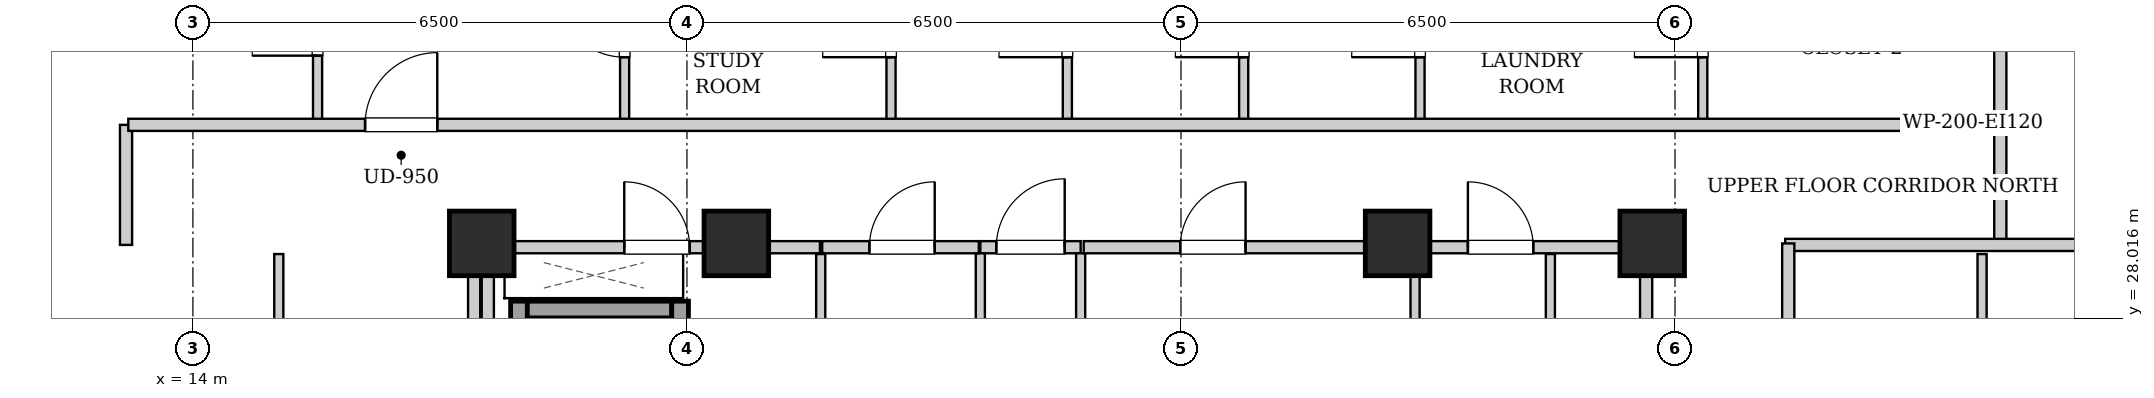
"""IFC4 building model, lengths in metres.
Left out: names, types, materials, properties, quantities, classifications, styles, units other than length and angle.
Written with IfcOpenShell. Run it as: python <this file> out.ifc"""

import sys

from ifc_helpers import new_model, si_unit, direction, frame, frame_2d, origin, origin_2d, place, context, subcontext, project, spatial, rectangle, extrude, element, fill, save


model = new_model("IFC4")
c1 = context("Model", 3, precision=1e-05, world=origin(), true_north=direction((0.0, 1.0)))
c2 = subcontext(c1, "Body", "Model", "MODEL_VIEW")
j1 = project(units=[si_unit("LENGTHUNIT", "METRE"), si_unit("PLANEANGLEUNIT", "RADIAN")], contexts=[c1])
p1 = place(None, origin())
s1 = spatial("IfcSite", under=j1, at=p1, CompositionType="ELEMENT")
p2 = place(p1, origin())
s2 = spatial("IfcBuilding", under=s1, at=p2, CompositionType="ELEMENT")
p3 = place(p2, frame((0.0, 0.0, 194.2)))
s3 = spatial("IfcBuildingStorey", under=s2, at=p3, CompositionType="ELEMENT", Elevation=194.2)
for number, where, z_axis, x_axis in (
    (1, (17.8, 29.0, 0.0), (0.0, 0.0, 1.0), (1.0, 0.0, 0.0)),
    (2, (21.15, 29.0, 0.0), (0.0, 0.0, 1.0), (1.0, 0.0, 0.0)),
    (3, (29.85, 29.0, 0.0), (0.0, 0.0, 1.0), (1.0, 0.0, 0.0)),
    (4, (33.2, 29.0, 0.0), (0.0, 0.0, 1.0), (1.0, 0.0, 0.0)),
):
    element("IfcColumn", number, at=place(p3, frame(where, z_axis=z_axis, x_axis=x_axis)), inside=s3, PredefinedType="COLUMN", context=c2, shape_type="SweptSolid", body=[
        extrude(rectangle(XDim=0.85, YDim=0.85, at=origin_2d()), origin(), (0.0, 0.0, 1.0), 3.3),
    ])
p4 = place(p3, frame((18.29, 24.1, 0.0), z_axis=(0.0, 0.0, 1.0), x_axis=(0.0, 1.0, 0.0)))
e5 = element("IfcWall", 5, at=p4, inside=s3, PredefinedType="SHEAR", context=c2, shape_type="SweptSolid", body=[
    extrude(rectangle(XDim=4.14, YDim=0.22, at=frame_2d((2.07, 0.0))), origin(), (0.0, 0.0, 1.0), 3.04),
])
p5 = place(p3, frame((18.4, 28.13, 0.0), z_axis=(0.0, 0.0, 1.0), x_axis=(1.0, 0.0, 0.0)))
e6 = element("IfcWall", 6, at=p5, inside=s3, PredefinedType="SHEAR", context=c2, shape_type="SweptSolid", body=[
    extrude(rectangle(XDim=1.9, YDim=0.22, at=frame_2d((0.95, 0.0))), origin(), (0.0, 0.0, 1.0), 3.04),
])
p6 = place(p3, frame((20.41, 26.06, 0.0), z_axis=(0.0, 0.0, 1.0), x_axis=(0.0, 1.0, 0.0)))
e7 = element("IfcWall", 7, at=p6, inside=s3, PredefinedType="SHEAR", context=c2, shape_type="SweptSolid", body=[
    extrude(rectangle(XDim=2.18, YDim=0.22, at=frame_2d((1.09, 0.0))), origin(), (0.0, 0.0, 1.0), 3.04),
])
p7 = place(p6, frame((0.54, 0.0, 0.0)))
e8 = element("IfcOpeningElement", 8, at=p7, cuts=e7, PredefinedType="OPENING", context=c2, shape_type="SweptSolid", body=[
    extrude(rectangle(XDim=1.1, YDim=2.15, at=frame_2d((0.55, 1.075))), frame((0.0, 0.12, 0.0), z_axis=(0.0, -1.0, 0.0), x_axis=(1.0, 0.0, 0.0)), (0.0, 0.0, 1.0), 0.24),
])
for number, where, z_axis, x_axis in (
    (9, (17.88, 24.12, 0.0), (0.0, 0.0, 1.0), (0.0, 1.0, 0.0)),
    (10, (33.12, 24.12, 0.0), (0.0, 0.0, 1.0), (0.0, 1.0, 0.0)),
):
    element("IfcWall", number, at=place(p3, frame(where, z_axis=z_axis, x_axis=x_axis)), inside=s3, PredefinedType="PARTITIONING", context=c2, shape_type="SweptSolid", body=[
        extrude(rectangle(XDim=4.76, YDim=0.16, at=frame_2d((2.38, 0.0))), origin(), (0.0, 0.0, 1.0), 3.04),
    ])
p8 = place(p3, frame((24.36, 28.95, 0.0), z_axis=(0.0, 0.0, 1.0), x_axis=(1.0, 0.0, 0.0)))
e11 = element("IfcWall", 11, at=p8, inside=s3, PredefinedType="PARTITIONING", context=c2, shape_type="SweptSolid", body=[
    extrude(rectangle(XDim=1.32, YDim=0.16, at=frame_2d((0.66, 0.0))), origin(), (0.0, 0.0, 1.0), 2.556),
])
p9 = place(p8, frame((0.21, 0.0, 0.0)))
e12 = element("IfcOpeningElement", 12, at=p9, cuts=e11, PredefinedType="OPENING", context=c2, shape_type="SweptSolid", body=[
    extrude(rectangle(XDim=0.9, YDim=2.05, at=frame_2d((0.45, 1.025))), frame((0.0, 0.09, 0.0), z_axis=(0.0, -1.0, 0.0), x_axis=(1.0, 0.0, 0.0)), (0.0, 0.0, 1.0), 0.18),
])
p10 = place(p3, frame((17.96, 28.95, 0.0), z_axis=(0.0, 0.0, 1.0), x_axis=(1.0, 0.0, 0.0)))
e13 = element("IfcWall", 13, at=p10, inside=s3, PredefinedType="PARTITIONING", context=c2, shape_type="SweptSolid", body=[
    extrude(rectangle(XDim=4.29, YDim=0.16, at=frame_2d((2.145, 0.0))), origin(), (0.0, 0.0, 1.0), 2.556),
])
p11 = place(p10, frame((1.715, 0.0, 0.0)))
e14 = element("IfcOpeningElement", 14, at=p11, cuts=e13, PredefinedType="OPENING", context=c2, shape_type="SweptSolid", body=[
    extrude(rectangle(XDim=0.86, YDim=2.05, at=frame_2d((0.43, 1.025))), frame((0.0, 0.09, 0.0), z_axis=(0.0, -1.0, 0.0), x_axis=(1.0, 0.0, 0.0)), (0.0, 0.0, 1.0), 0.18),
])
for number, where, z_axis, x_axis in (
    (15, (24.36, 25.0, 0.0), (0.0, 0.0, 1.0), (0.0, 1.0, 0.0)),
    (16, (25.68, 25.0, 0.0), (0.0, 0.0, 1.0), (0.0, 1.0, 0.0)),
):
    element("IfcWall", number, at=place(p3, frame(where, z_axis=z_axis, x_axis=x_axis)), inside=s3, PredefinedType="PARTITIONING", context=c2, shape_type="SweptSolid", body=[
        extrude(rectangle(XDim=3.87, YDim=0.12, at=frame_2d((1.935, 0.0))), origin(), (0.0, 0.0, 1.0), 3.04),
    ])
p12 = place(p3, frame((30.08, 26.18, 0.0), z_axis=(0.0, 0.0, 1.0), x_axis=(0.0, 1.0, 0.0)))
e17 = element("IfcWall", 17, at=p12, inside=s3, PredefinedType="PARTITIONING", context=c2, shape_type="SweptSolid", body=[
    extrude(rectangle(XDim=2.68, YDim=0.12, at=frame_2d((1.34, 0.0))), origin(), (0.0, 0.0, 1.0), 3.04),
])
p13 = place(p3, frame((31.86, 26.2, 0.0), z_axis=(0.0, 0.0, 1.0), x_axis=(0.0, 1.0, 0.0)))
e18 = element("IfcWall", 18, at=p13, inside=s3, PredefinedType="PARTITIONING", context=c2, shape_type="SweptSolid", body=[
    extrude(rectangle(XDim=2.66, YDim=0.12, at=frame_2d((1.33, 0.0))), origin(), (0.0, 0.0, 1.0), 3.04),
])
p14 = place(p13, frame((0.92, 0.0, 0.0)))
e19 = element("IfcOpeningElement", 19, at=p14, cuts=e18, PredefinedType="OPENING", context=c2, shape_type="SweptSolid", body=[
    extrude(rectangle(XDim=0.86, YDim=2.05, at=frame_2d((0.43, 1.025))), frame((0.0, 0.07, 0.0), z_axis=(0.0, -1.0, 0.0), x_axis=(1.0, 0.0, 0.0)), (0.0, 0.0, 1.0), 0.14),
])
p15 = place(p3, frame((30.08, 28.95, 0.0), z_axis=(0.0, 0.0, 1.0), x_axis=(1.0, 0.0, 0.0)))
e20 = element("IfcWall", 20, at=p15, inside=s3, PredefinedType="PARTITIONING", context=c2, shape_type="SweptSolid", body=[
    extrude(rectangle(XDim=2.96, YDim=0.16, at=frame_2d((1.48, 0.0))), origin(), (0.0, 0.0, 1.0), 3.04),
])
p16 = place(p15, frame((0.695, 0.0, 0.0)))
e21 = element("IfcOpeningElement", 21, at=p16, cuts=e20, PredefinedType="OPENING", context=c2, shape_type="SweptSolid", body=[
    extrude(rectangle(XDim=0.86, YDim=2.05, at=frame_2d((0.43, 1.025))), frame((0.0, 0.09, 0.0), z_axis=(0.0, -1.0, 0.0), x_axis=(1.0, 0.0, 0.0)), (0.0, 0.0, 1.0), 0.18),
])
p17 = place(p3, frame((22.26, 25.0, 0.0), z_axis=(0.0, 0.0, 1.0), x_axis=(0.0, 1.0, 0.0)))
e22 = element("IfcWall", 22, at=p17, inside=s3, PredefinedType="PARTITIONING", context=c2, shape_type="SweptSolid", body=[
    extrude(rectangle(XDim=3.86, YDim=0.12, at=frame_2d((1.93, 0.0))), origin(), (0.0, 0.0, 1.0), 3.04),
])
p18 = place(p3, frame((22.28, 28.95, 0.0), z_axis=(0.0, 0.0, 1.0), x_axis=(1.0, 0.0, 0.0)))
e23 = element("IfcWall", 23, at=p18, inside=s3, PredefinedType="PARTITIONING", context=c2, shape_type="SweptSolid", body=[
    extrude(rectangle(XDim=2.06, YDim=0.16, at=frame_2d((1.03, 0.0))), origin(), (0.0, 0.0, 1.0), 2.556),
])
p19 = place(p18, frame((0.62, 0.0, 0.0)))
e24 = element("IfcOpeningElement", 24, at=p19, cuts=e23, PredefinedType="OPENING", context=c2, shape_type="SweptSolid", body=[
    extrude(rectangle(XDim=0.86, YDim=2.05, at=frame_2d((0.43, 1.025))), frame((0.0, 0.09, 0.0), z_axis=(0.0, -1.0, 0.0), x_axis=(1.0, 0.0, 0.0)), (0.0, 0.0, 1.0), 0.18),
])
p20 = place(p3, frame((25.72, 28.95, 0.0), z_axis=(0.0, 0.0, 1.0), x_axis=(1.0, 0.0, 0.0)))
e25 = element("IfcWall", 25, at=p20, inside=s3, PredefinedType="PARTITIONING", context=c2, shape_type="SweptSolid", body=[
    extrude(rectangle(XDim=4.32, YDim=0.16, at=frame_2d((2.16, 0.0))), origin(), (0.0, 0.0, 1.0), 2.556),
])
p21 = place(p20, frame((1.27, 0.0, 0.0)))
e26 = element("IfcOpeningElement", 26, at=p21, cuts=e25, PredefinedType="OPENING", context=c2, shape_type="SweptSolid", body=[
    extrude(rectangle(XDim=0.86, YDim=2.05, at=frame_2d((0.43, 1.025))), frame((0.0, 0.09, 0.0), z_axis=(0.0, -1.0, 0.0), x_axis=(1.0, 0.0, 0.0)), (0.0, 0.0, 1.0), 0.18),
])
for number, where, z_axis, x_axis in (
    (27, (13.12, 28.98, 0.0), (0.0, 0.0, 1.0), (0.0, 1.0, 0.0)),
    (28, (37.78, 28.98, 0.0), (0.0, 0.0, 1.0), (0.0, 1.0, 0.0)),
):
    element("IfcWall", number, at=place(p3, frame(where, z_axis=z_axis, x_axis=x_axis)), inside=s3, PredefinedType="PARTITIONING", context=c2, shape_type="SweptSolid", body=[
        extrude(rectangle(XDim=1.58, YDim=0.16, at=frame_2d((0.79, 0.0))), origin(), (0.0, 0.0, 1.0), 3.04),
    ])
p22 = place(p3, frame((34.95, 28.98, 0.0), z_axis=(0.0, 0.0, 1.0), x_axis=(1.0, 0.0, 0.0)))
e29 = element("IfcWall", 29, at=p22, inside=s3, PredefinedType="PARTITIONING", context=c2, shape_type="SweptSolid", body=[
    extrude(rectangle(XDim=5.07, YDim=0.16, at=frame_2d((2.535, 0.0))), origin(), (0.0, 0.0, 1.0), 2.556),
])
p23 = place(p3, frame((37.78, 30.6, 0.0), z_axis=(0.0, 0.0, 1.0), x_axis=(0.0, 1.0, 0.0)))
e30 = element("IfcWall", 30, at=p23, inside=s3, PredefinedType="PARTITIONING", context=c2, shape_type="SweptSolid", body=[
    extrude(rectangle(XDim=2.66, YDim=0.16, at=frame_2d((1.33, 0.0))), origin(), (0.0, 0.0, 1.0), 3.04),
])
p24 = place(p3, frame((15.64, 30.6, 0.0), z_axis=(0.0, 0.0, 1.0), x_axis=(0.0, 1.0, 0.0)))
e31 = element("IfcWall", 31, at=p24, inside=s3, PredefinedType="PARTITIONING", context=c2, shape_type="SweptSolid", body=[
    extrude(rectangle(XDim=2.6, YDim=0.12, at=frame_2d((1.3, 0.0))), origin(), (0.0, 0.0, 1.0), 3.04),
])
p25 = place(p24, frame((0.87, 0.0, 0.0)))
e32 = element("IfcOpeningElement", 32, at=p25, cuts=e31, PredefinedType="OPENING", context=c2, shape_type="SweptSolid", body=[
    extrude(rectangle(XDim=0.86, YDim=2.05, at=frame_2d((0.43, 1.025))), frame((0.0, 0.07, 0.0), z_axis=(0.0, -1.0, 0.0), x_axis=(1.0, 0.0, 0.0)), (0.0, 0.0, 1.0), 0.14),
])
p26 = place(p3, frame((19.68, 30.6, 0.0), z_axis=(0.0, 0.0, 1.0), x_axis=(0.0, 1.0, 0.0)))
e33 = element("IfcWall", 33, at=p26, inside=s3, PredefinedType="PARTITIONING", context=c2, shape_type="SweptSolid", body=[
    extrude(rectangle(XDim=2.6, YDim=0.12, at=frame_2d((1.3, 0.0))), origin(), (0.0, 0.0, 1.0), 3.04),
])
p27 = place(p26, frame((0.85, 0.0, 0.0)))
e34 = element("IfcOpeningElement", 34, at=p27, cuts=e33, PredefinedType="OPENING", context=c2, shape_type="SweptSolid", body=[
    extrude(rectangle(XDim=0.9, YDim=2.05, at=frame_2d((0.45, 1.025))), frame((0.0, 0.07, 0.0), z_axis=(0.0, -1.0, 0.0), x_axis=(1.0, 0.0, 0.0)), (0.0, 0.0, 1.0), 0.14),
])
p28 = place(p3, frame((23.185, 30.6, 0.0), z_axis=(0.0, 0.0, 1.0), x_axis=(0.0, 1.0, 0.0)))
e35 = element("IfcWall", 35, at=p28, inside=s3, PredefinedType="PARTITIONING", context=c2, shape_type="SweptSolid", body=[
    extrude(rectangle(XDim=2.6, YDim=0.12, at=frame_2d((1.3, 0.0))), origin(), (0.0, 0.0, 1.0), 3.04),
])
p29 = place(p28, frame((0.85, 0.0, 0.0)))
e36 = element("IfcOpeningElement", 36, at=p29, cuts=e35, PredefinedType="OPENING", context=c2, shape_type="SweptSolid", body=[
    extrude(rectangle(XDim=0.9, YDim=2.05, at=frame_2d((0.45, 1.025))), frame((0.0, 0.07, 0.0), z_axis=(0.0, -1.0, 0.0), x_axis=(1.0, 0.0, 0.0)), (0.0, 0.0, 1.0), 0.14),
])
p30 = place(p3, frame((25.505, 30.6, 0.0), z_axis=(0.0, 0.0, 1.0), x_axis=(0.0, 1.0, 0.0)))
e37 = element("IfcWall", 37, at=p30, inside=s3, PredefinedType="PARTITIONING", context=c2, shape_type="SweptSolid", body=[
    extrude(rectangle(XDim=2.6, YDim=0.12, at=frame_2d((1.3, 0.0))), origin(), (0.0, 0.0, 1.0), 3.04),
])
p31 = place(p30, frame((0.85, 0.0, 0.0)))
e38 = element("IfcOpeningElement", 38, at=p31, cuts=e37, PredefinedType="OPENING", context=c2, shape_type="SweptSolid", body=[
    extrude(rectangle(XDim=0.9, YDim=2.05, at=frame_2d((0.45, 1.025))), frame((0.0, 0.07, 0.0), z_axis=(0.0, -1.0, 0.0), x_axis=(1.0, 0.0, 0.0)), (0.0, 0.0, 1.0), 0.14),
])
p32 = place(p3, frame((27.825, 30.6, 0.0), z_axis=(0.0, 0.0, 1.0), x_axis=(0.0, 1.0, 0.0)))
e39 = element("IfcWall", 39, at=p32, inside=s3, PredefinedType="PARTITIONING", context=c2, shape_type="SweptSolid", body=[
    extrude(rectangle(XDim=2.6, YDim=0.12, at=frame_2d((1.3, 0.0))), origin(), (0.0, 0.0, 1.0), 3.04),
])
p33 = place(p32, frame((0.85, 0.0, 0.0)))
e40 = element("IfcOpeningElement", 40, at=p33, cuts=e39, PredefinedType="OPENING", context=c2, shape_type="SweptSolid", body=[
    extrude(rectangle(XDim=0.9, YDim=2.05, at=frame_2d((0.45, 1.025))), frame((0.0, 0.07, 0.0), z_axis=(0.0, -1.0, 0.0), x_axis=(1.0, 0.0, 0.0)), (0.0, 0.0, 1.0), 0.14),
])
p34 = place(p3, frame((30.145, 30.6, 0.0), z_axis=(0.0, 0.0, 1.0), x_axis=(0.0, 1.0, 0.0)))
e41 = element("IfcWall", 41, at=p34, inside=s3, PredefinedType="PARTITIONING", context=c2, shape_type="SweptSolid", body=[
    extrude(rectangle(XDim=2.6, YDim=0.12, at=frame_2d((1.3, 0.0))), origin(), (0.0, 0.0, 1.0), 3.04),
])
p35 = place(p34, frame((0.85, 0.0, 0.0)))
e42 = element("IfcOpeningElement", 42, at=p35, cuts=e41, PredefinedType="OPENING", context=c2, shape_type="SweptSolid", body=[
    extrude(rectangle(XDim=0.9, YDim=2.05, at=frame_2d((0.45, 1.025))), frame((0.0, 0.07, 0.0), z_axis=(0.0, -1.0, 0.0), x_axis=(1.0, 0.0, 0.0)), (0.0, 0.0, 1.0), 0.14),
])
p36 = place(p3, frame((33.865, 30.6, 0.0), z_axis=(0.0, 0.0, 1.0), x_axis=(0.0, 1.0, 0.0)))
e43 = element("IfcWall", 43, at=p36, inside=s3, PredefinedType="PARTITIONING", context=c2, shape_type="SweptSolid", body=[
    extrude(rectangle(XDim=2.6, YDim=0.12, at=frame_2d((1.3, 0.0))), origin(), (0.0, 0.0, 1.0), 3.04),
])
p37 = place(p36, frame((0.85, 0.0, 0.0)))
e44 = element("IfcOpeningElement", 44, at=p37, cuts=e43, PredefinedType="OPENING", context=c2, shape_type="SweptSolid", body=[
    extrude(rectangle(XDim=0.9, YDim=2.05, at=frame_2d((0.45, 1.025))), frame((0.0, 0.07, 0.0), z_axis=(0.0, -1.0, 0.0), x_axis=(1.0, 0.0, 0.0)), (0.0, 0.0, 1.0), 0.14),
])
p38 = place(p3, frame((15.13, 24.552, 0.0), z_axis=(0.0, 0.0, 1.0), x_axis=(0.0, 1.0, 0.0)))
e45 = element("IfcWall", 45, at=p38, inside=s3, PredefinedType="PARTITIONING", context=c2, shape_type="SweptSolid", body=[
    extrude(rectangle(XDim=4.308, YDim=0.12, at=frame_2d((2.154, 0.0))), origin(), (0.0, 0.0, 1.0), 3.04),
])
p39 = place(p38, frame((1.704, 0.0, 0.0)))
e46 = element("IfcOpeningElement", 46, at=p39, cuts=e45, PredefinedType="OPENING", context=c2, shape_type="SweptSolid", body=[
    extrude(rectangle(XDim=0.9, YDim=2.05, at=frame_2d((0.45, 1.025))), frame((0.0, 0.07, 0.0), z_axis=(0.0, -1.0, 0.0), x_axis=(1.0, 0.0, 0.0)), (0.0, 0.0, 1.0), 0.14),
])
p40 = place(p3, frame((37.54, 24.552, 0.0), z_axis=(0.0, 0.0, 1.0), x_axis=(0.0, 1.0, 0.0)))
e47 = element("IfcWall", 47, at=p40, inside=s3, PredefinedType="PARTITIONING", context=c2, shape_type="SweptSolid", body=[
    extrude(rectangle(XDim=4.308, YDim=0.12, at=frame_2d((2.154, 0.0))), origin(), (0.0, 0.0, 1.0), 3.04),
])
p41 = place(p40, frame((1.704, 0.0, 0.0)))
e48 = element("IfcOpeningElement", 48, at=p41, cuts=e47, PredefinedType="OPENING", context=c2, shape_type="SweptSolid", body=[
    extrude(rectangle(XDim=0.9, YDim=2.05, at=frame_2d((0.45, 1.025))), frame((0.0, 0.07, 0.0), z_axis=(0.0, -1.0, 0.0), x_axis=(1.0, 0.0, 0.0)), (0.0, 0.0, 1.0), 0.14),
])
p42 = place(p3, frame((13.15, 30.56, 0.0), z_axis=(0.0, 0.0, 1.0), x_axis=(1.0, 0.0, 0.0)))
e49 = element("IfcWall", 49, at=p42, inside=s3, PredefinedType="PARTITIONING", context=c2, shape_type="SweptSolid", body=[
    extrude(rectangle(XDim=24.6, YDim=0.16, at=frame_2d((12.3, 0.0))), origin(), (0.0, 0.0, 1.0), 3.04),
])
p43 = place(p42, frame((3.115, 0.0, 0.0)))
e50 = element("IfcOpeningElement", 50, at=p43, cuts=e49, PredefinedType="OPENING", context=c2, shape_type="SweptSolid", body=[
    extrude(rectangle(XDim=0.95, YDim=2.1, at=frame_2d((0.475, 1.05))), frame((0.0, 0.09, 0.0), z_axis=(0.0, -1.0, 0.0), x_axis=(1.0, 0.0, 0.0)), (0.0, 0.0, 1.0), 0.18),
])
p44 = place(p3, frame((17.7, 15.02, 0.0), z_axis=(0.0, 0.0, 1.0), x_axis=(0.0, 1.0, 0.0)))
e51 = element("IfcWall", 51, at=p44, inside=s3, PredefinedType="PARTITIONING", context=c2, shape_type="SweptSolid", body=[
    extrude(rectangle(XDim=13.98, YDim=0.16, at=frame_2d((6.99, 0.0))), origin(), (0.0, 0.0, 1.0), 3.04),
])
p45 = place(p3, frame((34.99, 15.07, 0.0), z_axis=(0.0, 0.0, 1.0), x_axis=(0.0, 1.0, 0.0)))
e52 = element("IfcWall", 52, at=p45, inside=s3, PredefinedType="PARTITIONING", context=c2, shape_type="SweptSolid", body=[
    extrude(rectangle(XDim=13.93, YDim=0.16, at=frame_2d((6.965, 0.0))), origin(), (0.0, 0.0, 1.0), 3.04),
])
p46 = place(p45, frame((4.385, 0.0, 0.0)))
e53 = element("IfcOpeningElement", 53, at=p46, cuts=e52, PredefinedType="OPENING", context=c2, shape_type="SweptSolid", body=[
    extrude(rectangle(XDim=0.95, YDim=2.1, at=frame_2d((0.475, 1.05))), frame((0.0, 0.09, 0.0), z_axis=(0.0, -1.0, 0.0), x_axis=(1.0, 0.0, 0.0)), (0.0, 0.0, 1.0), 0.18),
])
p47 = place(p9, origin())
e54 = element("IfcDoor", 54, at=p47, inside=s3, OperationType="SINGLE_SWING_RIGHT", PredefinedType="DOOR", context=c2, shape_type="SweptSolid", body=[
    extrude(rectangle(XDim=0.9, YDim=2.05, at=frame_2d((0.45, 1.025))), frame((0.0, 0.025, 0.0), z_axis=(0.0, -1.0, 0.0), x_axis=(1.0, 0.0, 0.0)), (0.0, 0.0, 1.0), 0.05),
])
fill(e12, e54)
p48 = place(p11, origin())
e55 = element("IfcDoor", 55, at=p48, inside=s3, OperationType="SINGLE_SWING_LEFT", PredefinedType="DOOR", context=c2, shape_type="SweptSolid", body=[
    extrude(rectangle(XDim=0.86, YDim=2.05, at=frame_2d((0.43, 1.025))), frame((0.0, 0.025, 0.0), z_axis=(0.0, -1.0, 0.0), x_axis=(1.0, 0.0, 0.0)), (0.0, 0.0, 1.0), 0.05),
])
fill(e14, e55)
p49 = place(p16, origin())
e56 = element("IfcDoor", 56, at=p49, inside=s3, OperationType="SINGLE_SWING_LEFT", PredefinedType="DOOR", context=c2, shape_type="SweptSolid", body=[
    extrude(rectangle(XDim=0.86, YDim=2.05, at=frame_2d((0.43, 1.025))), frame((0.0, 0.025, 0.0), z_axis=(0.0, -1.0, 0.0), x_axis=(1.0, 0.0, 0.0)), (0.0, 0.0, 1.0), 0.05),
])
fill(e21, e56)
p50 = place(p19, origin())
e57 = element("IfcDoor", 57, at=p50, inside=s3, OperationType="SINGLE_SWING_RIGHT", PredefinedType="DOOR", context=c2, shape_type="SweptSolid", body=[
    extrude(rectangle(XDim=0.86, YDim=2.05, at=frame_2d((0.43, 1.025))), frame((0.0, 0.025, 0.0), z_axis=(0.0, -1.0, 0.0), x_axis=(1.0, 0.0, 0.0)), (0.0, 0.0, 1.0), 0.05),
])
fill(e24, e57)
p51 = place(p21, origin())
e58 = element("IfcDoor", 58, at=p51, inside=s3, OperationType="SINGLE_SWING_RIGHT", PredefinedType="DOOR", context=c2, shape_type="SweptSolid", body=[
    extrude(rectangle(XDim=0.86, YDim=2.05, at=frame_2d((0.43, 1.025))), frame((0.0, 0.025, 0.0), z_axis=(0.0, -1.0, 0.0), x_axis=(1.0, 0.0, 0.0)), (0.0, 0.0, 1.0), 0.05),
])
fill(e26, e58)
p52 = place(p25, origin())
e59 = element("IfcDoor", 59, at=p52, inside=s3, OperationType="SINGLE_SWING_LEFT", PredefinedType="DOOR", context=c2, shape_type="SweptSolid", body=[
    extrude(rectangle(XDim=0.86, YDim=2.05, at=frame_2d((0.43, 1.025))), frame((0.0, 0.025, 0.0), z_axis=(0.0, -1.0, 0.0), x_axis=(1.0, 0.0, 0.0)), (0.0, 0.0, 1.0), 0.05),
])
fill(e32, e59)
p53 = place(p27, origin())
e60 = element("IfcDoor", 60, at=p53, inside=s3, OperationType="SINGLE_SWING_RIGHT", PredefinedType="DOOR", context=c2, shape_type="SweptSolid", body=[
    extrude(rectangle(XDim=0.9, YDim=2.05, at=frame_2d((0.45, 1.025))), frame((0.0, 0.025, 0.0), z_axis=(0.0, -1.0, 0.0), x_axis=(1.0, 0.0, 0.0)), (0.0, 0.0, 1.0), 0.05),
])
fill(e34, e60)
p54 = place(p29, origin())
e61 = element("IfcDoor", 61, at=p54, inside=s3, OperationType="SINGLE_SWING_LEFT", PredefinedType="DOOR", context=c2, shape_type="SweptSolid", body=[
    extrude(rectangle(XDim=0.9, YDim=2.05, at=frame_2d((0.45, 1.025))), frame((0.0, 0.025, 0.0), z_axis=(0.0, -1.0, 0.0), x_axis=(1.0, 0.0, 0.0)), (0.0, 0.0, 1.0), 0.05),
])
fill(e36, e61)
p55 = place(p31, origin())
e62 = element("IfcDoor", 62, at=p55, inside=s3, OperationType="SINGLE_SWING_LEFT", PredefinedType="DOOR", context=c2, shape_type="SweptSolid", body=[
    extrude(rectangle(XDim=0.9, YDim=2.05, at=frame_2d((0.45, 1.025))), frame((0.0, 0.025, 0.0), z_axis=(0.0, -1.0, 0.0), x_axis=(1.0, 0.0, 0.0)), (0.0, 0.0, 1.0), 0.05),
])
fill(e38, e62)
p56 = place(p33, origin())
e63 = element("IfcDoor", 63, at=p56, inside=s3, OperationType="SINGLE_SWING_LEFT", PredefinedType="DOOR", context=c2, shape_type="SweptSolid", body=[
    extrude(rectangle(XDim=0.9, YDim=2.05, at=frame_2d((0.45, 1.025))), frame((0.0, 0.025, 0.0), z_axis=(0.0, -1.0, 0.0), x_axis=(1.0, 0.0, 0.0)), (0.0, 0.0, 1.0), 0.05),
])
fill(e40, e63)
p57 = place(p35, origin())
e64 = element("IfcDoor", 64, at=p57, inside=s3, OperationType="SINGLE_SWING_LEFT", PredefinedType="DOOR", context=c2, shape_type="SweptSolid", body=[
    extrude(rectangle(XDim=0.9, YDim=2.05, at=frame_2d((0.45, 1.025))), frame((0.0, 0.025, 0.0), z_axis=(0.0, -1.0, 0.0), x_axis=(1.0, 0.0, 0.0)), (0.0, 0.0, 1.0), 0.05),
])
fill(e42, e64)
p58 = place(p37, origin())
e65 = element("IfcDoor", 65, at=p58, inside=s3, OperationType="SINGLE_SWING_LEFT", PredefinedType="DOOR", context=c2, shape_type="SweptSolid", body=[
    extrude(rectangle(XDim=0.9, YDim=2.05, at=frame_2d((0.45, 1.025))), frame((0.0, 0.025, 0.0), z_axis=(0.0, -1.0, 0.0), x_axis=(1.0, 0.0, 0.0)), (0.0, 0.0, 1.0), 0.05),
])
fill(e44, e65)
p59 = place(p43, origin())
e66 = element("IfcDoor", 66, at=p59, inside=s3, OperationType="SINGLE_SWING_RIGHT", PredefinedType="DOOR", context=c2, shape_type="SweptSolid", body=[
    extrude(rectangle(XDim=0.95, YDim=2.1, at=frame_2d((0.475, 1.05))), frame((0.0, 0.025, 0.0), z_axis=(0.0, -1.0, 0.0), x_axis=(1.0, 0.0, 0.0)), (0.0, 0.0, 1.0), 0.05),
])
fill(e50, e66)
save(model, sys.argv[1])
